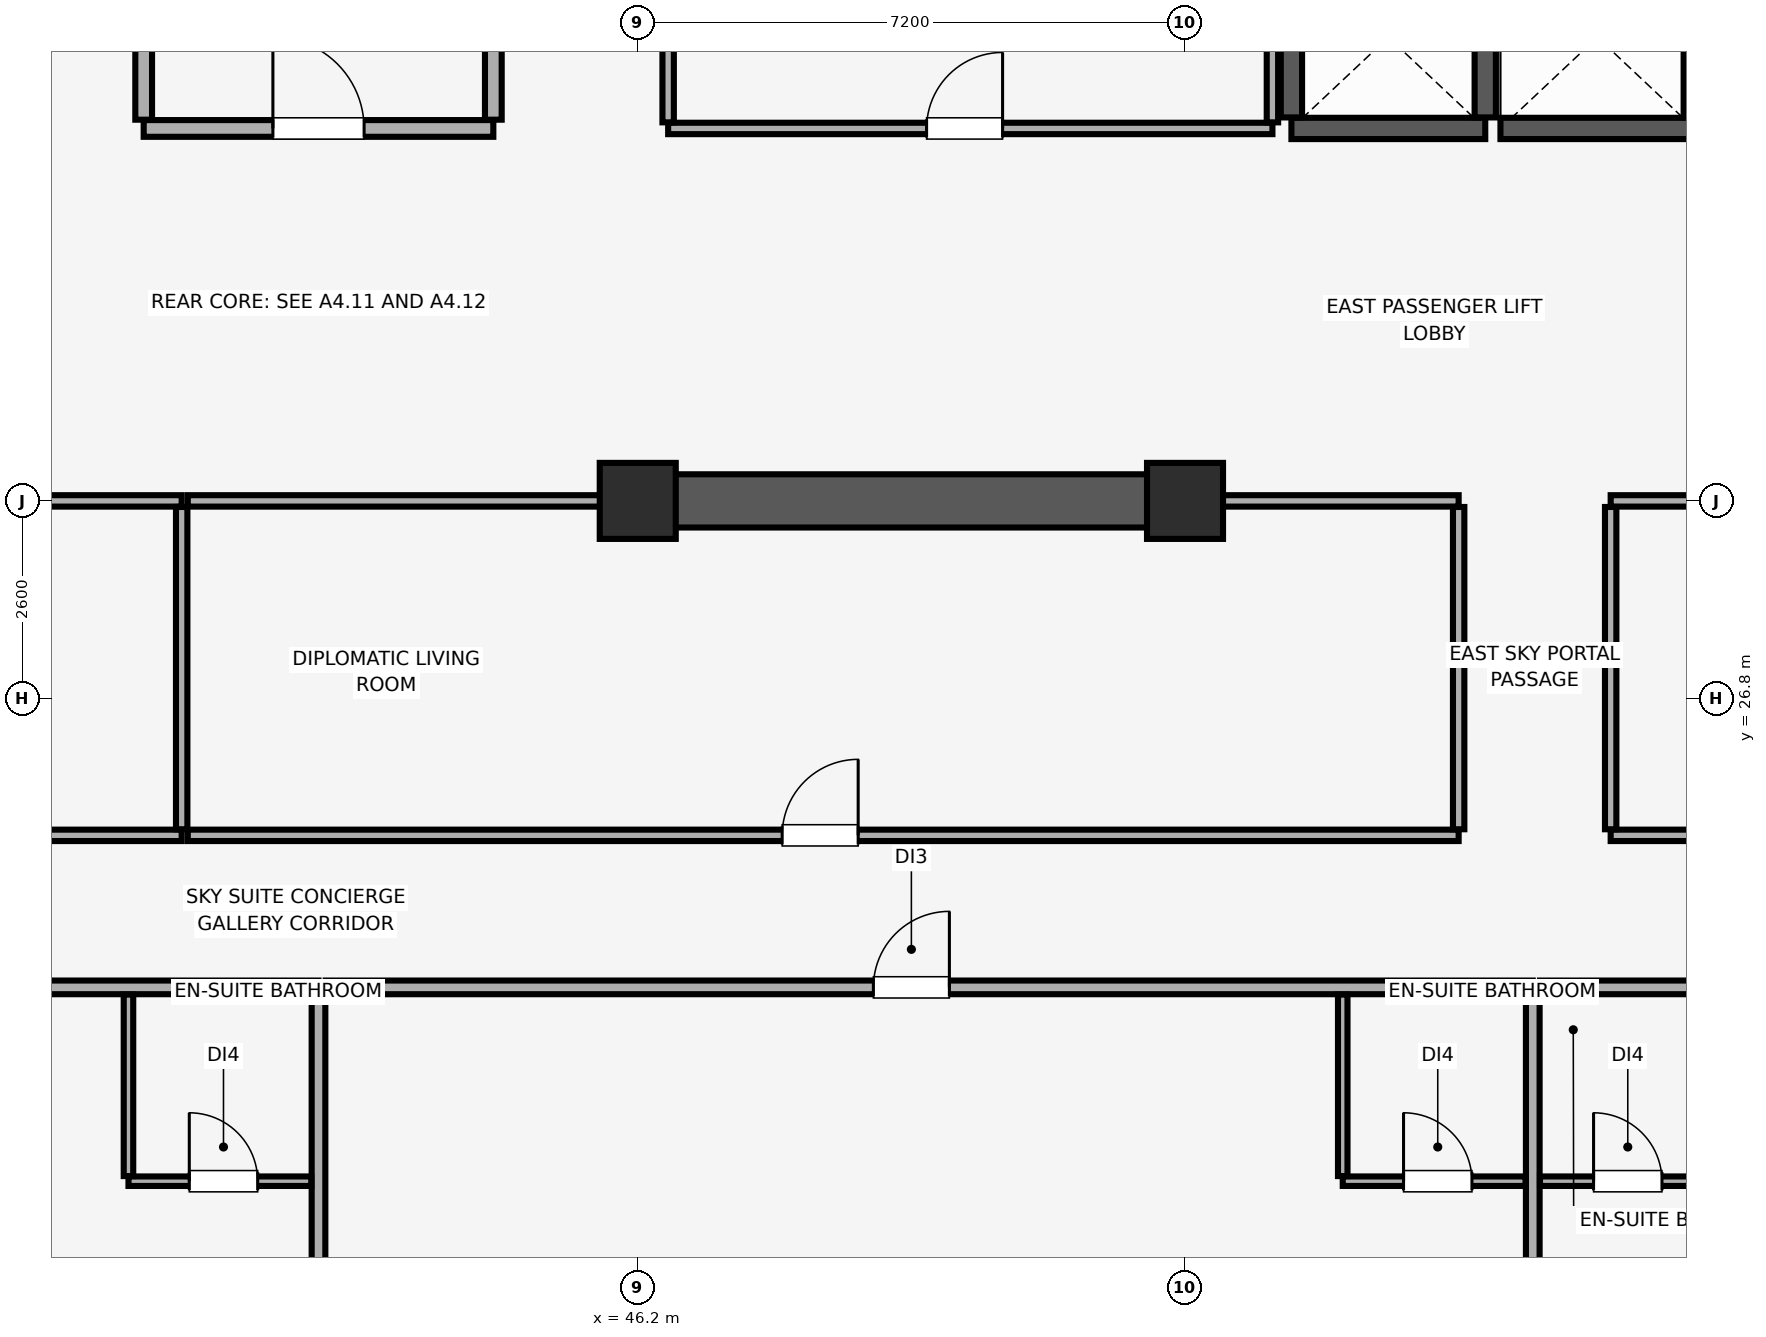
"""IFC4 building model, lengths in metres.
Left out: names, types, materials, properties, quantities, classifications, styles, units other than length and angle.
Written with IfcOpenShell. Run it as: python <this file> out.ifc"""

import sys

from ifc_helpers import new_model, si_unit, direction, frame, frame_2d, origin, origin_2d, place, context, subcontext, project, spatial, rectangle, extrude, element, fill, save


model = new_model("IFC4")
c1 = context("Model", 3, precision=1e-05, world=origin(), true_north=direction((0.0, 1.0)))
c2 = subcontext(c1, "Body", "Model", "MODEL_VIEW")
j1 = project(units=[si_unit("LENGTHUNIT", "METRE"), si_unit("PLANEANGLEUNIT", "RADIAN")], contexts=[c1])
p1 = place(None, origin())
s1 = spatial("IfcSite", under=j1, at=p1, CompositionType="ELEMENT")
p2 = place(p1, origin())
s2 = spatial("IfcBuilding", under=s1, at=p2, CompositionType="ELEMENT")
p3 = place(p2, frame((0.0, 0.0, 276.55)))
s3 = spatial("IfcBuildingStorey", under=s2, at=p3, CompositionType="ELEMENT", Elevation=276.55)
for number, where, z_axis, x_axis in (
    (1, (46.2, 29.4, 0.0), (0.0, 0.0, 1.0), (1.0, 0.0, 0.0)),
    (2, (53.4, 29.4, 0.0), (0.0, 0.0, 1.0), (1.0, 0.0, 0.0)),
):
    element("IfcColumn", number, at=place(p3, frame(where, z_axis=z_axis, x_axis=x_axis)), inside=s3, PredefinedType="COLUMN", context=c2, shape_type="SweptSolid", body=[
        extrude(rectangle(XDim=1.0, YDim=1.0, at=origin_2d()), origin(), (0.0, 0.0, 1.0), 3.6),
    ])
p4 = place(p3, frame((46.0, 29.4, 0.0), z_axis=(0.0, 0.0, 1.0), x_axis=(1.0, 0.0, 0.0)))
e3 = element("IfcWall", 3, at=p4, inside=s3, PredefinedType="SHEAR", context=c2, shape_type="SweptSolid", body=[
    extrude(rectangle(XDim=7.6, YDim=0.7, at=frame_2d((3.8, 0.0))), origin(), (0.0, 0.0, 1.0), 3.6),
])
p5 = place(p3, frame((54.8, 34.3, 0.0), z_axis=(0.0, 0.0, 1.0), x_axis=(1.0, 0.0, 0.0)))
e4 = element("IfcWall", 4, at=p5, inside=s3, PredefinedType="SHEAR", context=c2, shape_type="SweptSolid", body=[
    extrude(rectangle(XDim=2.55, YDim=0.28, at=frame_2d((1.275, 0.0))), origin(), (0.0, 0.0, 1.0), 3.6),
])
for number, where, z_axis, x_axis in (
    (5, (54.8, 34.445, 0.0), (0.0, 0.0, 1.0), (0.0, 1.0, 0.0)),
    (6, (57.35, 34.445, 0.0), (0.0, 0.0, 1.0), (0.0, 1.0, 0.0)),
):
    element("IfcWall", number, at=place(p3, frame(where, z_axis=z_axis, x_axis=x_axis)), inside=s3, PredefinedType="SHEAR", context=c2, shape_type="SweptSolid", body=[
        extrude(rectangle(XDim=2.11, YDim=0.28, at=frame_2d((1.055, 0.0))), origin(), (0.0, 0.0, 1.0), 3.6),
    ])
p6 = place(p3, frame((57.55, 34.3, 0.0), z_axis=(0.0, 0.0, 1.0), x_axis=(1.0, 0.0, 0.0)))
e7 = element("IfcWall", 7, at=p6, inside=s3, PredefinedType="SHEAR", context=c2, shape_type="SweptSolid", body=[
    extrude(rectangle(XDim=2.55, YDim=0.28, at=frame_2d((1.275, 0.0))), origin(), (0.0, 0.0, 1.0), 3.6),
])
p7 = place(p3, frame((60.1, 34.445, 0.0), z_axis=(0.0, 0.0, 1.0), x_axis=(0.0, 1.0, 0.0)))
e8 = element("IfcWall", 8, at=p7, inside=s3, PredefinedType="SHEAR", context=c2, shape_type="SweptSolid", body=[
    extrude(rectangle(XDim=2.11, YDim=0.28, at=frame_2d((1.055, 0.0))), origin(), (0.0, 0.0, 1.0), 3.6),
])
p8 = place(p3, frame((39.7, 34.3, 0.0), z_axis=(0.0, 0.0, 1.0), x_axis=(1.0, 0.0, 0.0)))
e9 = element("IfcWall", 9, at=p8, inside=s3, PredefinedType="PARTITIONING", context=c2, shape_type="SweptSolid", body=[
    extrude(rectangle(XDim=4.6, YDim=0.22, at=frame_2d((2.3, 0.0))), origin(), (0.0, 0.0, 1.0), 3.6),
])
p9 = place(p8, frame((1.7, 0.0, 0.0)))
e10 = element("IfcOpeningElement", 10, at=p9, cuts=e9, PredefinedType="OPENING", context=c2, shape_type="SweptSolid", body=[
    extrude(rectangle(XDim=1.2, YDim=2.15, at=frame_2d((0.6, 1.075))), frame((0.0, 0.12, 0.0), z_axis=(0.0, -1.0, 0.0), x_axis=(1.0, 0.0, 0.0)), (0.0, 0.0, 1.0), 0.24),
])
for number, where, z_axis, x_axis in (
    (11, (39.7, 34.415, 0.0), (0.0, 0.0, 1.0), (0.0, 1.0, 0.0)),
    (12, (44.3, 34.415, 0.0), (0.0, 0.0, 1.0), (0.0, 1.0, 0.0)),
):
    element("IfcWall", number, at=place(p3, frame(where, z_axis=z_axis, x_axis=x_axis)), inside=s3, PredefinedType="PARTITIONING", context=c2, shape_type="SweptSolid", body=[
        extrude(rectangle(XDim=5.785, YDim=0.22, at=frame_2d((2.893, 0.0))), origin(), (0.0, 0.0, 1.0), 3.6),
    ])
p10 = place(p3, frame((46.6, 34.3, 0.0), z_axis=(0.0, 0.0, 1.0), x_axis=(1.0, 0.0, 0.0)))
e13 = element("IfcWall", 13, at=p10, inside=s3, PredefinedType="PARTITIONING", context=c2, shape_type="SweptSolid", body=[
    extrude(rectangle(XDim=7.95, YDim=0.15, at=frame_2d((3.975, 0.0))), origin(), (0.0, 0.0, 1.0), 3.6),
])
p11 = place(p10, frame((3.4, 0.0, 0.0)))
e14 = element("IfcOpeningElement", 14, at=p11, cuts=e13, PredefinedType="OPENING", context=c2, shape_type="SweptSolid", body=[
    extrude(rectangle(XDim=1.0, YDim=2.15, at=frame_2d((0.5, 1.075))), frame((0.0, 0.085, 0.0), z_axis=(0.0, -1.0, 0.0), x_axis=(1.0, 0.0, 0.0)), (0.0, 0.0, 1.0), 0.17),
])
for number, where, z_axis, x_axis in (
    (15, (46.6, 34.38, 0.0), (0.0, 0.0, 1.0), (0.0, 1.0, 0.0)),
    (16, (54.55, 34.38, 0.0), (0.0, 0.0, 1.0), (0.0, 1.0, 0.0)),
):
    element("IfcWall", number, at=place(p3, frame(where, z_axis=z_axis, x_axis=x_axis)), inside=s3, PredefinedType="PARTITIONING", context=c2, shape_type="SweptSolid", body=[
        extrude(rectangle(XDim=4.94, YDim=0.15, at=frame_2d((2.47, 0.0))), origin(), (0.0, 0.0, 1.0), 3.6),
    ])
p12 = place(p3, frame((26.12, 23.0, 0.0), z_axis=(0.0, 0.0, 1.0), x_axis=(1.0, 0.0, 0.0)))
e17 = element("IfcWall", 17, at=p12, inside=s3, PredefinedType="PARTITIONING", context=c2, shape_type="SweptSolid", body=[
    extrude(rectangle(XDim=15.88, YDim=0.18, at=frame_2d((7.94, 0.0))), origin(), (0.0, 0.0, 1.0), 3.6),
])
p13 = place(p12, frame((7.58, 0.0, 0.0)))
e18 = element("IfcOpeningElement", 18, at=p13, cuts=e17, PredefinedType="OPENING", context=c2, shape_type="SweptSolid", body=[
    extrude(rectangle(XDim=1.0, YDim=2.15, at=frame_2d((0.5, 1.075))), frame((0.0, 0.1, 0.0), z_axis=(0.0, -1.0, 0.0), x_axis=(1.0, 0.0, 0.0)), (0.0, 0.0, 1.0), 0.2),
])
p14 = place(p3, frame((42.0, 6.15, 0.0), z_axis=(0.0, 0.0, 1.0), x_axis=(0.0, 1.0, 0.0)))
e19 = element("IfcWall", 19, at=p14, inside=s3, PredefinedType="PARTITIONING", context=c2, shape_type="SweptSolid", body=[
    extrude(rectangle(XDim=16.755, YDim=0.18, at=frame_2d((8.377, 0.0))), origin(), (0.0, 0.0, 1.0), 3.0),
])
p15 = place(p3, frame((39.5, 20.45, 0.0), z_axis=(0.0, 0.0, 1.0), x_axis=(1.0, 0.0, 0.0)))
e20 = element("IfcWall", 20, at=p15, inside=s3, PredefinedType="PARTITIONING", context=c2, shape_type="SweptSolid", body=[
    extrude(rectangle(XDim=2.405, YDim=0.125, at=frame_2d((1.203, 0.0))), origin(), (0.0, 0.0, 1.0), 3.6),
])
p16 = place(p15, frame((0.8, 0.0, 0.0)))
e21 = element("IfcOpeningElement", 21, at=p16, cuts=e20, PredefinedType="OPENING", context=c2, shape_type="SweptSolid", body=[
    extrude(rectangle(XDim=0.9, YDim=2.1, at=frame_2d((0.45, 1.05))), frame((0.0, 0.073, 0.0), z_axis=(0.0, -1.0, 0.0), x_axis=(1.0, 0.0, 0.0)), (0.0, 0.0, 1.0), 0.145),
])
p17 = place(p3, frame((39.5, 20.518, 0.0), z_axis=(0.0, 0.0, 1.0), x_axis=(0.0, 1.0, 0.0)))
e22 = element("IfcWall", 22, at=p17, inside=s3, PredefinedType="PARTITIONING", context=c2, shape_type="SweptSolid", body=[
    extrude(rectangle(XDim=2.387, YDim=0.125, at=frame_2d((1.194, 0.0))), origin(), (0.0, 0.0, 1.0), 3.6),
])
p18 = place(p3, frame((42.095, 23.0, 0.0), z_axis=(0.0, 0.0, 1.0), x_axis=(1.0, 0.0, 0.0)))
e23 = element("IfcWall", 23, at=p18, inside=s3, PredefinedType="PARTITIONING", context=c2, shape_type="SweptSolid", body=[
    extrude(rectangle(XDim=15.88, YDim=0.18, at=frame_2d((7.94, 0.0))), origin(), (0.0, 0.0, 1.0), 3.6),
])
p19 = place(p18, frame((7.205, 0.0, 0.0)))
e24 = element("IfcOpeningElement", 24, at=p19, cuts=e23, PredefinedType="OPENING", context=c2, shape_type="SweptSolid", body=[
    extrude(rectangle(XDim=1.0, YDim=2.15, at=frame_2d((0.5, 1.075))), frame((0.0, 0.1, 0.0), z_axis=(0.0, -1.0, 0.0), x_axis=(1.0, 0.0, 0.0)), (0.0, 0.0, 1.0), 0.2),
])
p20 = place(p3, frame((57.975, 6.15, 0.0), z_axis=(0.0, 0.0, 1.0), x_axis=(0.0, 1.0, 0.0)))
e25 = element("IfcWall", 25, at=p20, inside=s3, PredefinedType="PARTITIONING", context=c2, shape_type="SweptSolid", body=[
    extrude(rectangle(XDim=16.755, YDim=0.18, at=frame_2d((8.377, 0.0))), origin(), (0.0, 0.0, 1.0), 3.6),
])
p21 = place(p3, frame((55.475, 20.45, 0.0), z_axis=(0.0, 0.0, 1.0), x_axis=(1.0, 0.0, 0.0)))
e26 = element("IfcWall", 26, at=p21, inside=s3, PredefinedType="PARTITIONING", context=c2, shape_type="SweptSolid", body=[
    extrude(rectangle(XDim=2.405, YDim=0.125, at=frame_2d((1.202, 0.0))), origin(), (0.0, 0.0, 1.0), 3.6),
])
p22 = place(p21, frame((0.8, 0.0, 0.0)))
e27 = element("IfcOpeningElement", 27, at=p22, cuts=e26, PredefinedType="OPENING", context=c2, shape_type="SweptSolid", body=[
    extrude(rectangle(XDim=0.9, YDim=2.1, at=frame_2d((0.45, 1.05))), frame((0.0, 0.073, 0.0), z_axis=(0.0, -1.0, 0.0), x_axis=(1.0, 0.0, 0.0)), (0.0, 0.0, 1.0), 0.145),
])
p23 = place(p3, frame((55.475, 20.518, 0.0), z_axis=(0.0, 0.0, 1.0), x_axis=(0.0, 1.0, 0.0)))
e28 = element("IfcWall", 28, at=p23, inside=s3, PredefinedType="PARTITIONING", context=c2, shape_type="SweptSolid", body=[
    extrude(rectangle(XDim=2.387, YDim=0.125, at=frame_2d((1.194, 0.0))), origin(), (0.0, 0.0, 1.0), 3.6),
])
p24 = place(p3, frame((58.07, 23.0, 0.0), z_axis=(0.0, 0.0, 1.0), x_axis=(1.0, 0.0, 0.0)))
e29 = element("IfcWall", 29, at=p24, inside=s3, PredefinedType="PARTITIONING", context=c2, shape_type="SweptSolid", body=[
    extrude(rectangle(XDim=19.78, YDim=0.18, at=frame_2d((9.89, 0.0))), origin(), (0.0, 0.0, 1.0), 3.6),
])
p25 = place(p24, frame((5.63, 0.0, 0.0)))
e30 = element("IfcOpeningElement", 30, at=p25, cuts=e29, PredefinedType="OPENING", context=c2, shape_type="SweptSolid", body=[
    extrude(rectangle(XDim=1.0, YDim=2.15, at=frame_2d((0.5, 1.075))), frame((0.0, 0.1, 0.0), z_axis=(0.0, -1.0, 0.0), x_axis=(1.0, 0.0, 0.0)), (0.0, 0.0, 1.0), 0.2),
])
p26 = place(p3, frame((58.07, 20.45, 0.0), z_axis=(0.0, 0.0, 1.0), x_axis=(1.0, 0.0, 0.0)))
e31 = element("IfcWall", 31, at=p26, inside=s3, PredefinedType="PARTITIONING", context=c2, shape_type="SweptSolid", body=[
    extrude(rectangle(XDim=2.405, YDim=0.125, at=frame_2d((1.203, 0.0))), origin(), (0.0, 0.0, 1.0), 3.6),
])
p27 = place(p26, frame((0.705, 0.0, 0.0)))
e32 = element("IfcOpeningElement", 32, at=p27, cuts=e31, PredefinedType="OPENING", context=c2, shape_type="SweptSolid", body=[
    extrude(rectangle(XDim=0.9, YDim=2.1, at=frame_2d((0.45, 1.05))), frame((0.0, 0.073, 0.0), z_axis=(0.0, -1.0, 0.0), x_axis=(1.0, 0.0, 0.0)), (0.0, 0.0, 1.0), 0.145),
])
p28 = place(p3, frame((27.0, 25.0, 0.0), z_axis=(0.0, 0.0, 1.0), x_axis=(1.0, 0.0, 0.0)))
e33 = element("IfcWall", 33, at=p28, inside=s3, PredefinedType="PARTITIONING", context=c2, shape_type="SweptSolid", body=[
    extrude(rectangle(XDim=13.2, YDim=0.15, at=frame_2d((6.6, 0.0))), origin(), (0.0, 0.0, 1.0), 3.6),
])
p29 = place(p28, frame((6.1, 0.0, 0.0)))
e34 = element("IfcOpeningElement", 34, at=p29, cuts=e33, PredefinedType="OPENING", context=c2, shape_type="SweptSolid", body=[
    extrude(rectangle(XDim=1.0, YDim=2.15, at=frame_2d((0.5, 1.075))), frame((0.0, 0.085, 0.0), z_axis=(0.0, -1.0, 0.0), x_axis=(1.0, 0.0, 0.0)), (0.0, 0.0, 1.0), 0.17),
])
p30 = place(p3, frame((38.01, 29.4, 0.0), z_axis=(0.0, 0.0, 1.0), x_axis=(1.0, 0.0, 0.0)))
e35 = element("IfcWall", 35, at=p30, inside=s3, PredefinedType="PARTITIONING", context=c2, shape_type="SweptSolid", body=[
    extrude(rectangle(XDim=2.19, YDim=0.15, at=frame_2d((1.095, 0.0))), origin(), (0.0, 0.0, 1.0), 2.5),
])
p31 = place(p3, frame((40.2, 25.08, 0.0), z_axis=(0.0, 0.0, 1.0), x_axis=(0.0, 1.0, 0.0)))
e36 = element("IfcWall", 36, at=p31, inside=s3, PredefinedType="PARTITIONING", context=c2, shape_type="SweptSolid", body=[
    extrude(rectangle(XDim=4.24, YDim=0.15, at=frame_2d((2.12, 0.0))), origin(), (0.0, 0.0, 1.0), 3.6),
])
p32 = place(p3, frame((40.28, 25.0, 0.0), z_axis=(0.0, 0.0, 1.0), x_axis=(1.0, 0.0, 0.0)))
e37 = element("IfcWall", 37, at=p32, inside=s3, PredefinedType="PARTITIONING", context=c2, shape_type="SweptSolid", body=[
    extrude(rectangle(XDim=16.72, YDim=0.15, at=frame_2d((8.36, 0.0))), origin(), (0.0, 0.0, 1.0), 3.6),
])
p33 = place(p32, frame((7.82, 0.0, 0.0)))
e38 = element("IfcOpeningElement", 38, at=p33, cuts=e37, PredefinedType="OPENING", context=c2, shape_type="SweptSolid", body=[
    extrude(rectangle(XDim=1.0, YDim=2.15, at=frame_2d((0.5, 1.075))), frame((0.0, 0.085, 0.0), z_axis=(0.0, -1.0, 0.0), x_axis=(1.0, 0.0, 0.0)), (0.0, 0.0, 1.0), 0.17),
])
p34 = place(p3, frame((40.28, 29.4, 0.0), z_axis=(0.0, 0.0, 1.0), x_axis=(1.0, 0.0, 0.0)))
e39 = element("IfcWall", 39, at=p34, inside=s3, PredefinedType="PARTITIONING", context=c2, shape_type="SweptSolid", body=[
    extrude(rectangle(XDim=5.71, YDim=0.15, at=frame_2d((2.855, 0.0))), origin(), (0.0, 0.0, 1.0), 2.5),
])
p35 = place(p3, frame((53.61, 29.4, 0.0), z_axis=(0.0, 0.0, 1.0), x_axis=(1.0, 0.0, 0.0)))
e40 = element("IfcWall", 40, at=p35, inside=s3, PredefinedType="PARTITIONING", context=c2, shape_type="SweptSolid", body=[
    extrude(rectangle(XDim=3.39, YDim=0.15, at=frame_2d((1.695, 0.0))), origin(), (0.0, 0.0, 1.0), 2.5),
])
p36 = place(p3, frame((57.0, 25.08, 0.0), z_axis=(0.0, 0.0, 1.0), x_axis=(0.0, 1.0, 0.0)))
e41 = element("IfcWall", 41, at=p36, inside=s3, PredefinedType="PARTITIONING", context=c2, shape_type="SweptSolid", body=[
    extrude(rectangle(XDim=4.24, YDim=0.15, at=frame_2d((2.12, 0.0))), origin(), (0.0, 0.0, 1.0), 3.1),
])
p37 = place(p3, frame((59.0, 25.0, 0.0), z_axis=(0.0, 0.0, 1.0), x_axis=(1.0, 0.0, 0.0)))
e42 = element("IfcWall", 42, at=p37, inside=s3, PredefinedType="PARTITIONING", context=c2, shape_type="SweptSolid", body=[
    extrude(rectangle(XDim=9.0, YDim=0.15, at=frame_2d((4.5, 0.0))), origin(), (0.0, 0.0, 1.0), 3.6),
])
p38 = place(p37, frame((4.0, 0.0, 0.0)))
e43 = element("IfcOpeningElement", 43, at=p38, cuts=e42, PredefinedType="OPENING", context=c2, shape_type="SweptSolid", body=[
    extrude(rectangle(XDim=1.0, YDim=2.15, at=frame_2d((0.5, 1.075))), frame((0.0, 0.085, 0.0), z_axis=(0.0, -1.0, 0.0), x_axis=(1.0, 0.0, 0.0)), (0.0, 0.0, 1.0), 0.17),
])
p39 = place(p3, frame((59.0, 29.4, 0.0), z_axis=(0.0, 0.0, 1.0), x_axis=(1.0, 0.0, 0.0)))
e44 = element("IfcWall", 44, at=p39, inside=s3, PredefinedType="PARTITIONING", context=c2, shape_type="SweptSolid", body=[
    extrude(rectangle(XDim=1.39, YDim=0.15, at=frame_2d((0.695, 0.0))), origin(), (0.0, 0.0, 1.0), 2.5),
])
p40 = place(p3, frame((59.0, 25.08, 0.0), z_axis=(0.0, 0.0, 1.0), x_axis=(0.0, 1.0, 0.0)))
e45 = element("IfcWall", 45, at=p40, inside=s3, PredefinedType="PARTITIONING", context=c2, shape_type="SweptSolid", body=[
    extrude(rectangle(XDim=4.24, YDim=0.15, at=frame_2d((2.12, 0.0))), origin(), (0.0, 0.0, 1.0), 3.6),
])
p41 = place(p9, origin())
e46 = element("IfcDoor", 46, at=p41, inside=s3, OperationType="SINGLE_SWING_LEFT", PredefinedType="DOOR", context=c2, shape_type="SweptSolid", body=[
    extrude(rectangle(XDim=1.2, YDim=2.15, at=frame_2d((0.6, 1.075))), frame((0.0, 0.025, 0.0), z_axis=(0.0, -1.0, 0.0), x_axis=(1.0, 0.0, 0.0)), (0.0, 0.0, 1.0), 0.05),
])
fill(e10, e46)
p42 = place(p11, origin())
e47 = element("IfcDoor", 47, at=p42, inside=s3, OperationType="SINGLE_SWING_RIGHT", PredefinedType="DOOR", context=c2, shape_type="SweptSolid", body=[
    extrude(rectangle(XDim=1.0, YDim=2.15, at=frame_2d((0.5, 1.075))), frame((0.0, 0.025, 0.0), z_axis=(0.0, -1.0, 0.0), x_axis=(1.0, 0.0, 0.0)), (0.0, 0.0, 1.0), 0.05),
])
fill(e14, e47)
p43 = place(p16, origin())
e48 = element("IfcDoor", 48, at=p43, inside=s3, OperationType="SINGLE_SWING_LEFT", PredefinedType="DOOR", context=c2, shape_type="SweptSolid", body=[
    extrude(rectangle(XDim=0.9, YDim=2.1, at=frame_2d((0.45, 1.05))), frame((0.0, 0.025, 0.0), z_axis=(0.0, -1.0, 0.0), x_axis=(1.0, 0.0, 0.0)), (0.0, 0.0, 1.0), 0.05),
])
fill(e21, e48)
p44 = place(p19, origin())
e49 = element("IfcDoor", 49, at=p44, inside=s3, OperationType="SINGLE_SWING_RIGHT", PredefinedType="DOOR", context=c2, shape_type="SweptSolid", body=[
    extrude(rectangle(XDim=1.0, YDim=2.15, at=frame_2d((0.5, 1.075))), frame((0.0, 0.025, 0.0), z_axis=(0.0, -1.0, 0.0), x_axis=(1.0, 0.0, 0.0)), (0.0, 0.0, 1.0), 0.05),
])
fill(e24, e49)
p45 = place(p22, origin())
e50 = element("IfcDoor", 50, at=p45, inside=s3, OperationType="SINGLE_SWING_LEFT", PredefinedType="DOOR", context=c2, shape_type="SweptSolid", body=[
    extrude(rectangle(XDim=0.9, YDim=2.1, at=frame_2d((0.45, 1.05))), frame((0.0, 0.025, 0.0), z_axis=(0.0, -1.0, 0.0), x_axis=(1.0, 0.0, 0.0)), (0.0, 0.0, 1.0), 0.05),
])
fill(e27, e50)
p46 = place(p27, origin())
e51 = element("IfcDoor", 51, at=p46, inside=s3, OperationType="SINGLE_SWING_LEFT", PredefinedType="DOOR", context=c2, shape_type="SweptSolid", body=[
    extrude(rectangle(XDim=0.9, YDim=2.1, at=frame_2d((0.45, 1.05))), frame((0.0, 0.025, 0.0), z_axis=(0.0, -1.0, 0.0), x_axis=(1.0, 0.0, 0.0)), (0.0, 0.0, 1.0), 0.05),
])
fill(e32, e51)
p47 = place(p33, origin())
e52 = element("IfcDoor", 52, at=p47, inside=s3, OperationType="SINGLE_SWING_RIGHT", PredefinedType="DOOR", context=c2, shape_type="SweptSolid", body=[
    extrude(rectangle(XDim=1.0, YDim=2.15, at=frame_2d((0.5, 1.075))), frame((0.0, 0.025, 0.0), z_axis=(0.0, -1.0, 0.0), x_axis=(1.0, 0.0, 0.0)), (0.0, 0.0, 1.0), 0.05),
])
fill(e38, e52)
save(model, sys.argv[1])
